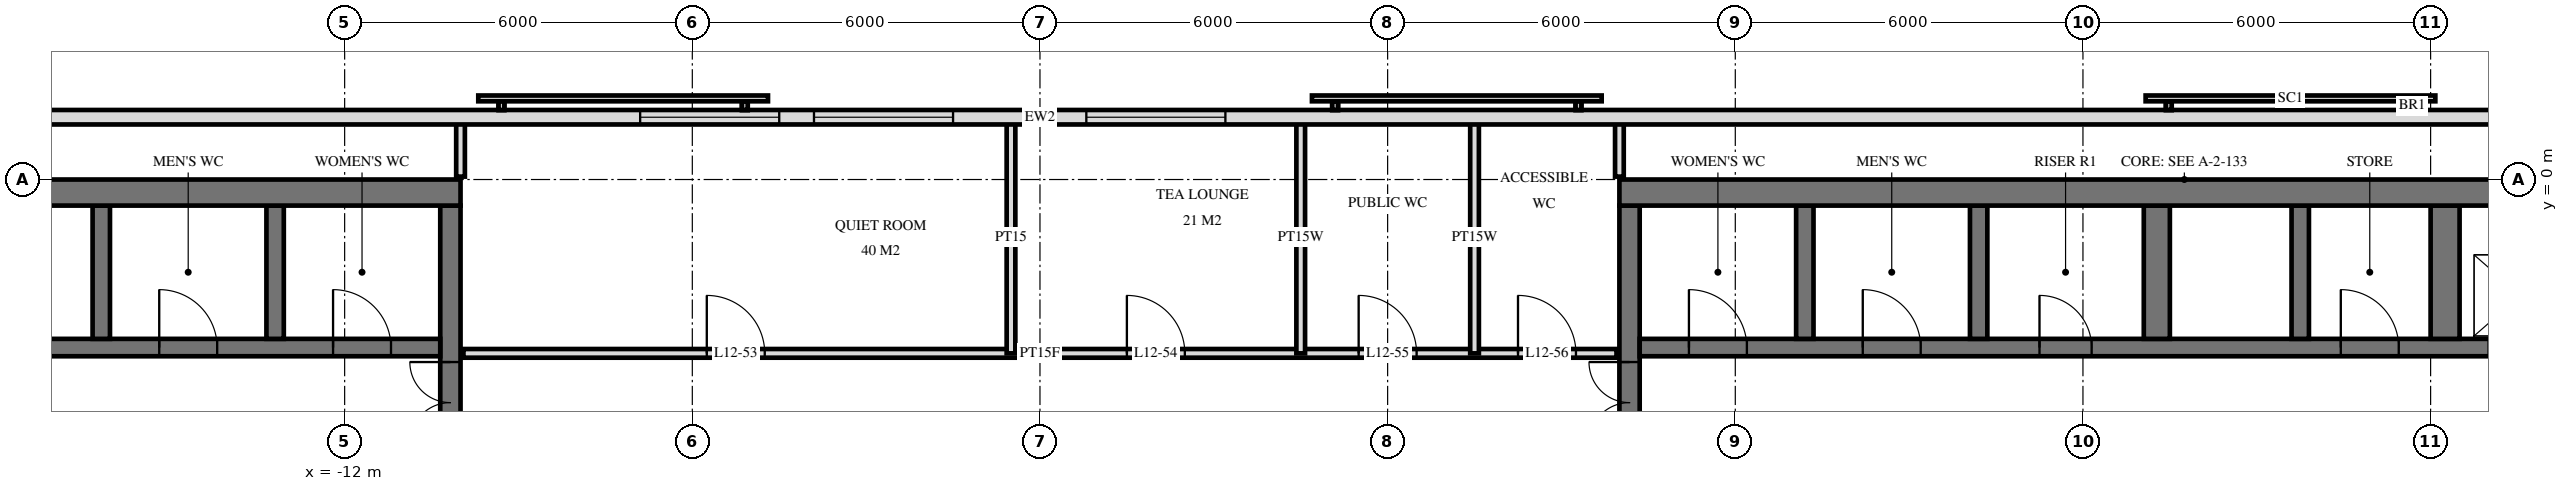
"""IFC4 building model, lengths in metres.
Left out: names, types, materials, properties, quantities, classifications, styles, units other than length and angle.
Written with IfcOpenShell. Run it as: python <this file> out.ifc"""

import sys

from ifc_helpers import new_model, si_unit, direction, frame, frame_2d, origin, place, context, subcontext, project, spatial, rectangle, extrude, element, fill, save


model = new_model("IFC4")
c1 = context("Model", 3, precision=1e-05, world=origin(), true_north=direction((0.0, 1.0)))
c2 = subcontext(c1, "Body", "Model", "MODEL_VIEW")
j1 = project(units=[si_unit("LENGTHUNIT", "METRE"), si_unit("PLANEANGLEUNIT", "RADIAN")], contexts=[c1])
p1 = place(None, origin())
s1 = spatial("IfcSite", under=j1, at=p1, CompositionType="ELEMENT")
p2 = place(p1, origin())
s2 = spatial("IfcBuilding", under=s1, at=p2, CompositionType="ELEMENT")
p3 = place(p2, frame((0.0, 0.0, 52.8)))
s3 = spatial("IfcBuildingStorey", under=s2, at=p3, CompositionType="ELEMENT", Elevation=52.8)
p4 = place(p3, frame((-29.5, -0.225, 0.0), z_axis=(0.0, 0.0, 1.0), x_axis=(1.0, 0.0, 0.0)))
e1 = element("IfcWall", 1, at=p4, inside=s3, PredefinedType="SHEAR", context=c2, shape_type="SweptSolid", body=[
    extrude(rectangle(XDim=19.5, YDim=0.45, at=frame_2d((9.75, 0.0))), origin(), (0.0, 0.0, 1.0), 3.6),
])
p5 = place(p3, frame((-10.175, -14.55, 0.0), z_axis=(0.0, 0.0, 1.0), x_axis=(0.0, 1.0, 0.0)))
e2 = element("IfcWall", 2, at=p5, inside=s3, PredefinedType="SHEAR", context=c2, shape_type="SweptSolid", body=[
    extrude(rectangle(XDim=14.1, YDim=0.35, at=frame_2d((7.05, 0.0))), origin(), (0.0, 0.0, 1.0), 3.6),
])
p6 = place(p5, frame((8.4, 0.0, 0.0)))
e3 = element("IfcOpeningElement", 3, at=p6, cuts=e2, PredefinedType="OPENING", context=c2, shape_type="SweptSolid", body=[
    extrude(rectangle(XDim=1.4, YDim=2.4, at=frame_2d((0.7, 1.2))), frame((0.0, 0.185, 0.0), z_axis=(0.0, -1.0, 0.0), x_axis=(1.0, 0.0, 0.0)), (0.0, 0.0, 1.0), 0.37),
])
p7 = place(p5, frame((10.0, 0.0, 0.0)))
e4 = element("IfcOpeningElement", 4, at=p7, cuts=e2, PredefinedType="OPENING", context=c2, shape_type="SweptSolid", body=[
    extrude(rectangle(XDim=1.4, YDim=2.4, at=frame_2d((0.7, 1.2))), frame((0.0, 0.185, 0.0), z_axis=(0.0, -1.0, 0.0), x_axis=(1.0, 0.0, 0.0)), (0.0, 0.0, 1.0), 0.37),
])
p8 = place(p5, frame((4.0, 0.0, 0.0)))
e5 = element("IfcOpeningElement", 5, at=p8, cuts=e2, PredefinedType="OPENING", context=c2, shape_type="SweptSolid", body=[
    extrude(rectangle(XDim=1.2, YDim=2.1, at=frame_2d((0.6, 1.05))), frame((0.0, 0.185, 0.0), z_axis=(0.0, -1.0, 0.0), x_axis=(1.0, 0.0, 0.0)), (0.0, 0.0, 1.0), 0.37),
])
p9 = place(p3, frame((-29.05, -2.9, 0.0), z_axis=(0.0, 0.0, 1.0), x_axis=(1.0, 0.0, 0.0)))
e6 = element("IfcWall", 6, at=p9, inside=s3, PredefinedType="SHEAR", context=c2, shape_type="SweptSolid", body=[
    extrude(rectangle(XDim=18.7, YDim=0.3, at=frame_2d((9.35, 0.0))), origin(), (0.0, 0.0, 1.0), 3.6),
])
p10 = place(p9, frame((2.95, 0.0, 0.0)))
e7 = element("IfcOpeningElement", 7, at=p10, cuts=e6, PredefinedType="OPENING", context=c2, shape_type="SweptSolid", body=[
    extrude(rectangle(XDim=1.1, YDim=2.1, at=frame_2d((0.55, 1.05))), frame((0.0, 0.16, 0.0), z_axis=(0.0, -1.0, 0.0), x_axis=(1.0, 0.0, 0.0)), (0.0, 0.0, 1.0), 0.32),
])
p11 = place(p9, frame((0.55, 0.0, 0.0)))
e8 = element("IfcOpeningElement", 8, at=p11, cuts=e6, PredefinedType="OPENING", context=c2, shape_type="SweptSolid", body=[
    extrude(rectangle(XDim=1.1, YDim=2.1, at=frame_2d((0.55, 1.05))), frame((0.0, 0.16, 0.0), z_axis=(0.0, -1.0, 0.0), x_axis=(1.0, 0.0, 0.0)), (0.0, 0.0, 1.0), 0.32),
])
p12 = place(p9, frame((10.9, 0.0, 0.0)))
e9 = element("IfcOpeningElement", 9, at=p12, cuts=e6, PredefinedType="OPENING", context=c2, shape_type="SweptSolid", body=[
    extrude(rectangle(XDim=0.9, YDim=2.1, at=frame_2d((0.45, 1.05))), frame((0.0, 0.16, 0.0), z_axis=(0.0, -1.0, 0.0), x_axis=(1.0, 0.0, 0.0)), (0.0, 0.0, 1.0), 0.32),
])
p13 = place(p9, frame((16.85, 0.0, 0.0)))
e10 = element("IfcOpeningElement", 10, at=p13, cuts=e6, PredefinedType="OPENING", context=c2, shape_type="SweptSolid", body=[
    extrude(rectangle(XDim=1.0, YDim=2.1, at=frame_2d((0.5, 1.05))), frame((0.0, 0.16, 0.0), z_axis=(0.0, -1.0, 0.0), x_axis=(1.0, 0.0, 0.0)), (0.0, 0.0, 1.0), 0.32),
])
p14 = place(p9, frame((13.85, 0.0, 0.0)))
e11 = element("IfcOpeningElement", 11, at=p14, cuts=e6, PredefinedType="OPENING", context=c2, shape_type="SweptSolid", body=[
    extrude(rectangle(XDim=1.0, YDim=2.1, at=frame_2d((0.5, 1.05))), frame((0.0, 0.16, 0.0), z_axis=(0.0, -1.0, 0.0), x_axis=(1.0, 0.0, 0.0)), (0.0, 0.0, 1.0), 0.32),
])
p15 = place(p9, frame((5.6, 0.0, 0.0)))
e12 = element("IfcOpeningElement", 12, at=p15, cuts=e6, PredefinedType="OPENING", context=c2, shape_type="SweptSolid", body=[
    extrude(rectangle(XDim=1.0, YDim=2.1, at=frame_2d((0.5, 1.05))), frame((0.0, 0.16, 0.0), z_axis=(0.0, -1.0, 0.0), x_axis=(1.0, 0.0, 0.0)), (0.0, 0.0, 1.0), 0.32),
])
for number, where, z_axis, x_axis in (
    (13, (-13.2, -2.75, 0.0), (0.0, 0.0, 1.0), (0.0, 1.0, 0.0)),
    (14, (-16.2, -2.75, 0.0), (0.0, 0.0, 1.0), (0.0, 1.0, 0.0)),
):
    element("IfcWall", number, at=place(p3, frame(where, z_axis=z_axis, x_axis=x_axis)), inside=s3, PredefinedType="SHEAR", context=c2, shape_type="SweptSolid", body=[
        extrude(rectangle(XDim=2.3, YDim=0.3, at=frame_2d((1.15, 0.0))), origin(), (0.0, 0.0, 1.0), 3.6),
    ])
p16 = place(p3, frame((10.0, -0.225, 0.0), z_axis=(0.0, 0.0, 1.0), x_axis=(1.0, 0.0, 0.0)))
e15 = element("IfcWall", 15, at=p16, inside=s3, PredefinedType="SHEAR", context=c2, shape_type="SweptSolid", body=[
    extrude(rectangle(XDim=19.5, YDim=0.45, at=frame_2d((9.75, 0.0))), origin(), (0.0, 0.0, 1.0), 3.6),
])
p17 = place(p3, frame((10.175, -14.55, 0.0), z_axis=(0.0, 0.0, 1.0), x_axis=(0.0, 1.0, 0.0)))
e16 = element("IfcWall", 16, at=p17, inside=s3, PredefinedType="SHEAR", context=c2, shape_type="SweptSolid", body=[
    extrude(rectangle(XDim=14.1, YDim=0.35, at=frame_2d((7.05, 0.0))), origin(), (0.0, 0.0, 1.0), 3.6),
])
p18 = place(p17, frame((8.4, 0.0, 0.0)))
e17 = element("IfcOpeningElement", 17, at=p18, cuts=e16, PredefinedType="OPENING", context=c2, shape_type="SweptSolid", body=[
    extrude(rectangle(XDim=1.4, YDim=2.4, at=frame_2d((0.7, 1.2))), frame((0.0, 0.185, 0.0), z_axis=(0.0, -1.0, 0.0), x_axis=(1.0, 0.0, 0.0)), (0.0, 0.0, 1.0), 0.37),
])
p19 = place(p17, frame((10.0, 0.0, 0.0)))
e18 = element("IfcOpeningElement", 18, at=p19, cuts=e16, PredefinedType="OPENING", context=c2, shape_type="SweptSolid", body=[
    extrude(rectangle(XDim=1.4, YDim=2.4, at=frame_2d((0.7, 1.2))), frame((0.0, 0.185, 0.0), z_axis=(0.0, -1.0, 0.0), x_axis=(1.0, 0.0, 0.0)), (0.0, 0.0, 1.0), 0.37),
])
p20 = place(p17, frame((4.0, 0.0, 0.0)))
e19 = element("IfcOpeningElement", 19, at=p20, cuts=e16, PredefinedType="OPENING", context=c2, shape_type="SweptSolid", body=[
    extrude(rectangle(XDim=1.2, YDim=2.1, at=frame_2d((0.6, 1.05))), frame((0.0, 0.185, 0.0), z_axis=(0.0, -1.0, 0.0), x_axis=(1.0, 0.0, 0.0)), (0.0, 0.0, 1.0), 0.37),
])
p21 = place(p3, frame((10.35, -2.9, 0.0), z_axis=(0.0, 0.0, 1.0), x_axis=(1.0, 0.0, 0.0)))
e20 = element("IfcWall", 20, at=p21, inside=s3, PredefinedType="SHEAR", context=c2, shape_type="SweptSolid", body=[
    extrude(rectangle(XDim=18.7, YDim=0.3, at=frame_2d((9.35, 0.0))), origin(), (0.0, 0.0, 1.0), 3.6),
])
p22 = place(p21, frame((14.65, 0.0, 0.0)))
e21 = element("IfcOpeningElement", 21, at=p22, cuts=e20, PredefinedType="OPENING", context=c2, shape_type="SweptSolid", body=[
    extrude(rectangle(XDim=1.1, YDim=2.1, at=frame_2d((0.55, 1.05))), frame((0.0, 0.16, 0.0), z_axis=(0.0, -1.0, 0.0), x_axis=(1.0, 0.0, 0.0)), (0.0, 0.0, 1.0), 0.32),
])
p23 = place(p21, frame((17.05, 0.0, 0.0)))
e22 = element("IfcOpeningElement", 22, at=p23, cuts=e20, PredefinedType="OPENING", context=c2, shape_type="SweptSolid", body=[
    extrude(rectangle(XDim=1.1, YDim=2.1, at=frame_2d((0.55, 1.05))), frame((0.0, 0.16, 0.0), z_axis=(0.0, -1.0, 0.0), x_axis=(1.0, 0.0, 0.0)), (0.0, 0.0, 1.0), 0.32),
])
p24 = place(p21, frame((6.9, 0.0, 0.0)))
e23 = element("IfcOpeningElement", 23, at=p24, cuts=e20, PredefinedType="OPENING", context=c2, shape_type="SweptSolid", body=[
    extrude(rectangle(XDim=0.9, YDim=2.1, at=frame_2d((0.45, 1.05))), frame((0.0, 0.16, 0.0), z_axis=(0.0, -1.0, 0.0), x_axis=(1.0, 0.0, 0.0)), (0.0, 0.0, 1.0), 0.32),
])
p25 = place(p21, frame((0.85, 0.0, 0.0)))
e24 = element("IfcOpeningElement", 24, at=p25, cuts=e20, PredefinedType="OPENING", context=c2, shape_type="SweptSolid", body=[
    extrude(rectangle(XDim=1.0, YDim=2.1, at=frame_2d((0.5, 1.05))), frame((0.0, 0.16, 0.0), z_axis=(0.0, -1.0, 0.0), x_axis=(1.0, 0.0, 0.0)), (0.0, 0.0, 1.0), 0.32),
])
p26 = place(p21, frame((3.85, 0.0, 0.0)))
e25 = element("IfcOpeningElement", 25, at=p26, cuts=e20, PredefinedType="OPENING", context=c2, shape_type="SweptSolid", body=[
    extrude(rectangle(XDim=1.0, YDim=2.1, at=frame_2d((0.5, 1.05))), frame((0.0, 0.16, 0.0), z_axis=(0.0, -1.0, 0.0), x_axis=(1.0, 0.0, 0.0)), (0.0, 0.0, 1.0), 0.32),
])
p27 = place(p21, frame((12.1, 0.0, 0.0)))
e26 = element("IfcOpeningElement", 26, at=p27, cuts=e20, PredefinedType="OPENING", context=c2, shape_type="SweptSolid", body=[
    extrude(rectangle(XDim=1.0, YDim=2.1, at=frame_2d((0.5, 1.05))), frame((0.0, 0.16, 0.0), z_axis=(0.0, -1.0, 0.0), x_axis=(1.0, 0.0, 0.0)), (0.0, 0.0, 1.0), 0.32),
])
for number, where, z_axis, x_axis in (
    (27, (13.2, -2.75, 0.0), (0.0, 0.0, 1.0), (0.0, 1.0, 0.0)),
    (28, (16.2, -2.75, 0.0), (0.0, 0.0, 1.0), (0.0, 1.0, 0.0)),
):
    element("IfcWall", number, at=place(p3, frame(where, z_axis=z_axis, x_axis=x_axis)), inside=s3, PredefinedType="SHEAR", context=c2, shape_type="SweptSolid", body=[
        extrude(rectangle(XDim=2.3, YDim=0.3, at=frame_2d((1.15, 0.0))), origin(), (0.0, 0.0, 1.0), 3.6),
    ])
p28 = place(p3, frame((19.275, -2.75, 0.0), z_axis=(0.0, 0.0, 1.0), x_axis=(0.0, 1.0, 0.0)))
e29 = element("IfcWall", 29, at=p28, inside=s3, PredefinedType="SHEAR", context=c2, shape_type="SweptSolid", body=[
    extrude(rectangle(XDim=2.3, YDim=0.45, at=frame_2d((1.15, 0.0))), origin(), (0.0, 0.0, 1.0), 3.6),
])
p29 = place(p3, frame((21.75, -2.75, 0.0), z_axis=(0.0, 0.0, 1.0), x_axis=(0.0, 1.0, 0.0)))
e30 = element("IfcWall", 30, at=p29, inside=s3, PredefinedType="SHEAR", context=c2, shape_type="SweptSolid", body=[
    extrude(rectangle(XDim=2.3, YDim=0.3, at=frame_2d((1.15, 0.0))), origin(), (0.0, 0.0, 1.0), 3.6),
])
p30 = place(p3, frame((24.25, -2.75, 0.0), z_axis=(0.0, 0.0, 1.0), x_axis=(0.0, 1.0, 0.0)))
e31 = element("IfcWall", 31, at=p30, inside=s3, PredefinedType="SHEAR", context=c2, shape_type="SweptSolid", body=[
    extrude(rectangle(XDim=2.3, YDim=0.5, at=frame_2d((1.15, 0.0))), origin(), (0.0, 0.0, 1.0), 3.6),
])
p31 = place(p3, frame((28.775, 1.075, 0.0), z_axis=(0.0, 0.0, 1.0), x_axis=(-1.0, 0.0, 0.0)))
e32 = element("IfcWall", 32, at=p31, inside=s3, PredefinedType="SOLIDWALL", context=c2, shape_type="SweptSolid", body=[
    extrude(rectangle(XDim=57.551, YDim=0.25, at=frame_2d((28.775, 0.0))), origin(), (0.0, 0.0, 1.0), 3.32),
])
p32 = place(p31, frame((25.575, 0.0, 0.3)))
e33 = element("IfcOpeningElement", 33, at=p32, cuts=e32, PredefinedType="OPENING", context=c2, shape_type="SweptSolid", body=[
    extrude(rectangle(XDim=2.4, YDim=2.1, at=frame_2d((1.2, 1.05))), frame((0.0, 0.135, 0.0), z_axis=(0.0, -1.0, 0.0), x_axis=(1.0, 0.0, 0.0)), (0.0, 0.0, 1.0), 0.27),
])
p33 = place(p31, frame((30.275, 0.0, 0.3)))
e34 = element("IfcOpeningElement", 34, at=p33, cuts=e32, PredefinedType="OPENING", context=c2, shape_type="SweptSolid", body=[
    extrude(rectangle(XDim=2.4, YDim=2.1, at=frame_2d((1.2, 1.05))), frame((0.0, 0.135, 0.0), z_axis=(0.0, -1.0, 0.0), x_axis=(1.0, 0.0, 0.0)), (0.0, 0.0, 1.0), 0.27),
])
p34 = place(p31, frame((33.275, 0.0, 0.3)))
e35 = element("IfcOpeningElement", 35, at=p34, cuts=e32, PredefinedType="OPENING", context=c2, shape_type="SweptSolid", body=[
    extrude(rectangle(XDim=2.4, YDim=2.1, at=frame_2d((1.2, 1.05))), frame((0.0, 0.135, 0.0), z_axis=(0.0, -1.0, 0.0), x_axis=(1.0, 0.0, 0.0)), (0.0, 0.0, 1.0), 0.27),
])
p35 = place(p3, frame((10.0, 0.05, 0.0), z_axis=(0.0, 0.0, 1.0), x_axis=(0.0, 1.0, 0.0)))
e36 = element("IfcWall", 36, at=p35, inside=s3, PredefinedType="PLUMBINGWALL", context=c2, shape_type="SweptSolid", body=[
    extrude(rectangle(XDim=0.97, YDim=0.15, at=frame_2d((0.485, 0.0))), origin(), (0.0, 0.0, 1.0), 3.32),
])
for number, where, z_axis, x_axis in (
    (37, (7.5, -3.0, 0.0), (0.0, 0.0, 1.0), (0.0, 1.0, 0.0)),
    (38, (4.5, -3.0, 0.0), (0.0, 0.0, 1.0), (0.0, 1.0, 0.0)),
):
    element("IfcWall", number, at=place(p3, frame(where, z_axis=z_axis, x_axis=x_axis)), inside=s3, PredefinedType="PLUMBINGWALL", context=c2, shape_type="SweptSolid", body=[
        extrude(rectangle(XDim=4.02, YDim=0.15, at=frame_2d((2.01, 0.0))), origin(), (0.0, 0.0, 1.0), 3.32),
    ])
p36 = place(p3, frame((-0.5, -3.0, 0.0), z_axis=(0.0, 0.0, 1.0), x_axis=(0.0, 1.0, 0.0)))
e39 = element("IfcWall", 39, at=p36, inside=s3, PredefinedType="PARTITIONING", context=c2, shape_type="SweptSolid", body=[
    extrude(rectangle(XDim=4.02, YDim=0.15, at=frame_2d((2.01, 0.0))), origin(), (0.0, 0.0, 1.0), 3.32),
])
p37 = place(p3, frame((-10.0, 0.05, 0.0), z_axis=(0.0, 0.0, 1.0), x_axis=(0.0, 1.0, 0.0)))
e40 = element("IfcWall", 40, at=p37, inside=s3, PredefinedType="PARTITIONING", context=c2, shape_type="SweptSolid", body=[
    extrude(rectangle(XDim=0.97, YDim=0.15, at=frame_2d((0.485, 0.0))), origin(), (0.0, 0.0, 1.0), 3.32),
])
p38 = place(p3, frame((-9.95, -3.0, 0.0), z_axis=(0.0, 0.0, 1.0), x_axis=(1.0, 0.0, 0.0)))
e41 = element("IfcWall", 41, at=p38, inside=s3, PredefinedType="PARTITIONING", context=c2, shape_type="SweptSolid", body=[
    extrude(rectangle(XDim=19.9, YDim=0.15, at=frame_2d((9.95, 0.0))), origin(), (0.0, 0.0, 1.0), 3.32),
])
p39 = place(p38, frame((4.2, 0.0, 0.0)))
e42 = element("IfcOpeningElement", 42, at=p39, cuts=e41, PredefinedType="OPENING", context=c2, shape_type="SweptSolid", body=[
    extrude(rectangle(XDim=1.0, YDim=2.1, at=frame_2d((0.5, 1.05))), frame((0.0, 0.085, 0.0), z_axis=(0.0, -1.0, 0.0), x_axis=(1.0, 0.0, 0.0)), (0.0, 0.0, 1.0), 0.17),
])
p40 = place(p38, frame((11.45, 0.0, 0.0)))
e43 = element("IfcOpeningElement", 43, at=p40, cuts=e41, PredefinedType="OPENING", context=c2, shape_type="SweptSolid", body=[
    extrude(rectangle(XDim=1.0, YDim=2.1, at=frame_2d((0.5, 1.05))), frame((0.0, 0.085, 0.0), z_axis=(0.0, -1.0, 0.0), x_axis=(1.0, 0.0, 0.0)), (0.0, 0.0, 1.0), 0.17),
])
p41 = place(p38, frame((15.45, 0.0, 0.0)))
e44 = element("IfcOpeningElement", 44, at=p41, cuts=e41, PredefinedType="OPENING", context=c2, shape_type="SweptSolid", body=[
    extrude(rectangle(XDim=1.0, YDim=2.1, at=frame_2d((0.5, 1.05))), frame((0.0, 0.085, 0.0), z_axis=(0.0, -1.0, 0.0), x_axis=(1.0, 0.0, 0.0)), (0.0, 0.0, 1.0), 0.17),
])
p42 = place(p38, frame((18.2, 0.0, 0.0)))
e45 = element("IfcOpeningElement", 45, at=p42, cuts=e41, PredefinedType="OPENING", context=c2, shape_type="SweptSolid", body=[
    extrude(rectangle(XDim=1.0, YDim=2.1, at=frame_2d((0.5, 1.05))), frame((0.0, 0.085, 0.0), z_axis=(0.0, -1.0, 0.0), x_axis=(1.0, 0.0, 0.0)), (0.0, 0.0, 1.0), 0.17),
])
p43 = place(p32, origin())
e46 = element("IfcWindow", 46, at=p43, inside=s3, PartitioningType="SINGLE_PANEL", PredefinedType="WINDOW", context=c2, shape_type="SweptSolid", body=[
    extrude(rectangle(XDim=2.4, YDim=2.1, at=frame_2d((1.2, 1.05))), frame((0.0, 0.03, 0.0), z_axis=(0.0, -1.0, 0.0), x_axis=(1.0, 0.0, 0.0)), (0.0, 0.0, 1.0), 0.06),
])
fill(e33, e46)
p44 = place(p33, origin())
e47 = element("IfcWindow", 47, at=p44, inside=s3, PartitioningType="SINGLE_PANEL", PredefinedType="WINDOW", context=c2, shape_type="SweptSolid", body=[
    extrude(rectangle(XDim=2.4, YDim=2.1, at=frame_2d((1.2, 1.05))), frame((0.0, 0.03, 0.0), z_axis=(0.0, -1.0, 0.0), x_axis=(1.0, 0.0, 0.0)), (0.0, 0.0, 1.0), 0.06),
])
fill(e34, e47)
p45 = place(p34, origin())
e48 = element("IfcWindow", 48, at=p45, inside=s3, PartitioningType="SINGLE_PANEL", PredefinedType="WINDOW", context=c2, shape_type="SweptSolid", body=[
    extrude(rectangle(XDim=2.4, YDim=2.1, at=frame_2d((1.2, 1.05))), frame((0.0, 0.03, 0.0), z_axis=(0.0, -1.0, 0.0), x_axis=(1.0, 0.0, 0.0)), (0.0, 0.0, 1.0), 0.06),
])
fill(e35, e48)
p46 = place(p7, origin())
e49 = element("IfcDoor", 49, at=p46, inside=s3, OperationType="DOUBLE_DOOR_SINGLE_SWING", PredefinedType="DOOR", context=c2, shape_type="SweptSolid", body=[
    extrude(rectangle(XDim=1.4, YDim=2.4, at=frame_2d((0.7, 1.2))), frame((0.0, 0.025, 0.0), z_axis=(0.0, -1.0, 0.0), x_axis=(1.0, 0.0, 0.0)), (0.0, 0.0, 1.0), 0.05),
])
fill(e4, e49)
p47 = place(p13, origin())
e50 = element("IfcDoor", 50, at=p47, inside=s3, OperationType="SINGLE_SWING_RIGHT", PredefinedType="DOOR", context=c2, shape_type="SweptSolid", body=[
    extrude(rectangle(XDim=1.0, YDim=2.1, at=frame_2d((0.5, 1.05))), frame((0.0, 0.025, 0.0), z_axis=(0.0, -1.0, 0.0), x_axis=(1.0, 0.0, 0.0)), (0.0, 0.0, 1.0), 0.05),
])
fill(e10, e50)
p48 = place(p14, origin())
e51 = element("IfcDoor", 51, at=p48, inside=s3, OperationType="SINGLE_SWING_RIGHT", PredefinedType="DOOR", context=c2, shape_type="SweptSolid", body=[
    extrude(rectangle(XDim=1.0, YDim=2.1, at=frame_2d((0.5, 1.05))), frame((0.0, 0.025, 0.0), z_axis=(0.0, -1.0, 0.0), x_axis=(1.0, 0.0, 0.0)), (0.0, 0.0, 1.0), 0.05),
])
fill(e11, e51)
p49 = place(p19, origin())
e52 = element("IfcDoor", 52, at=p49, inside=s3, OperationType="DOUBLE_DOOR_SINGLE_SWING", PredefinedType="DOOR", context=c2, shape_type="SweptSolid", body=[
    extrude(rectangle(XDim=1.4, YDim=2.4, at=frame_2d((0.7, 1.2))), frame((0.0, 0.025, 0.0), z_axis=(0.0, -1.0, 0.0), x_axis=(1.0, 0.0, 0.0)), (0.0, 0.0, 1.0), 0.05),
])
fill(e18, e52)
p50 = place(p24, origin())
e53 = element("IfcDoor", 53, at=p50, inside=s3, OperationType="SINGLE_SWING_RIGHT", PredefinedType="DOOR", context=c2, shape_type="SweptSolid", body=[
    extrude(rectangle(XDim=0.9, YDim=2.1, at=frame_2d((0.45, 1.05))), frame((0.0, 0.025, 0.0), z_axis=(0.0, -1.0, 0.0), x_axis=(1.0, 0.0, 0.0)), (0.0, 0.0, 1.0), 0.05),
])
fill(e23, e53)
p51 = place(p25, origin())
e54 = element("IfcDoor", 54, at=p51, inside=s3, OperationType="SINGLE_SWING_RIGHT", PredefinedType="DOOR", context=c2, shape_type="SweptSolid", body=[
    extrude(rectangle(XDim=1.0, YDim=2.1, at=frame_2d((0.5, 1.05))), frame((0.0, 0.025, 0.0), z_axis=(0.0, -1.0, 0.0), x_axis=(1.0, 0.0, 0.0)), (0.0, 0.0, 1.0), 0.05),
])
fill(e24, e54)
p52 = place(p26, origin())
e55 = element("IfcDoor", 55, at=p52, inside=s3, OperationType="SINGLE_SWING_RIGHT", PredefinedType="DOOR", context=c2, shape_type="SweptSolid", body=[
    extrude(rectangle(XDim=1.0, YDim=2.1, at=frame_2d((0.5, 1.05))), frame((0.0, 0.025, 0.0), z_axis=(0.0, -1.0, 0.0), x_axis=(1.0, 0.0, 0.0)), (0.0, 0.0, 1.0), 0.05),
])
fill(e25, e55)
p53 = place(p27, origin())
e56 = element("IfcDoor", 56, at=p53, inside=s3, OperationType="SINGLE_SWING_RIGHT", PredefinedType="DOOR", context=c2, shape_type="SweptSolid", body=[
    extrude(rectangle(XDim=1.0, YDim=2.1, at=frame_2d((0.5, 1.05))), frame((0.0, 0.025, 0.0), z_axis=(0.0, -1.0, 0.0), x_axis=(1.0, 0.0, 0.0)), (0.0, 0.0, 1.0), 0.05),
])
fill(e26, e56)
p54 = place(p39, origin())
e57 = element("IfcDoor", 57, at=p54, inside=s3, OperationType="SINGLE_SWING_RIGHT", PredefinedType="DOOR", context=c2, shape_type="SweptSolid", body=[
    extrude(rectangle(XDim=1.0, YDim=2.1, at=frame_2d((0.5, 1.05))), frame((0.0, 0.025, 0.0), z_axis=(0.0, -1.0, 0.0), x_axis=(1.0, 0.0, 0.0)), (0.0, 0.0, 1.0), 0.05),
])
fill(e42, e57)
p55 = place(p40, origin())
e58 = element("IfcDoor", 58, at=p55, inside=s3, OperationType="SINGLE_SWING_RIGHT", PredefinedType="DOOR", context=c2, shape_type="SweptSolid", body=[
    extrude(rectangle(XDim=1.0, YDim=2.1, at=frame_2d((0.5, 1.05))), frame((0.0, 0.025, 0.0), z_axis=(0.0, -1.0, 0.0), x_axis=(1.0, 0.0, 0.0)), (0.0, 0.0, 1.0), 0.05),
])
fill(e43, e58)
p56 = place(p41, origin())
e59 = element("IfcDoor", 59, at=p56, inside=s3, OperationType="SINGLE_SWING_RIGHT", PredefinedType="DOOR", context=c2, shape_type="SweptSolid", body=[
    extrude(rectangle(XDim=1.0, YDim=2.1, at=frame_2d((0.5, 1.05))), frame((0.0, 0.025, 0.0), z_axis=(0.0, -1.0, 0.0), x_axis=(1.0, 0.0, 0.0)), (0.0, 0.0, 1.0), 0.05),
])
fill(e44, e59)
p57 = place(p42, origin())
e60 = element("IfcDoor", 60, at=p57, inside=s3, OperationType="SINGLE_SWING_RIGHT", PredefinedType="DOOR", context=c2, shape_type="SweptSolid", body=[
    extrude(rectangle(XDim=1.0, YDim=2.1, at=frame_2d((0.5, 1.05))), frame((0.0, 0.025, 0.0), z_axis=(0.0, -1.0, 0.0), x_axis=(1.0, 0.0, 0.0)), (0.0, 0.0, 1.0), 0.05),
])
fill(e45, e60)
save(model, sys.argv[1])
